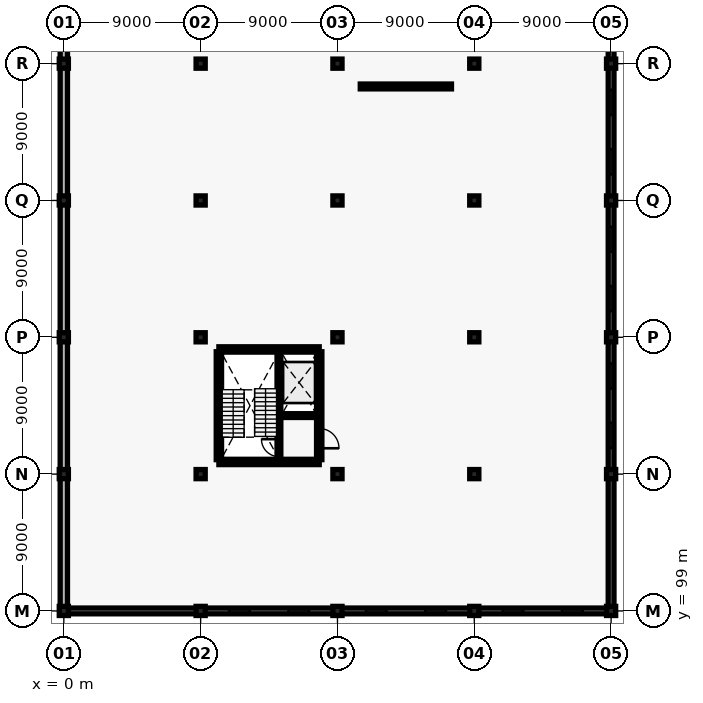
"""IFC4 building model, lengths in metres.
Left out: names, types, materials, properties, quantities, classifications, styles, units other than length and angle.
Written with IfcOpenShell. Run it as: python <this file> out.ifc"""

import sys

from ifc_helpers import new_model, si_unit, direction, frame, frame_2d, origin, origin_2d, place, context, subcontext, project, spatial, rectangle, extrude, element, fill, save


model = new_model("IFC4")
c1 = context("Model", 3, precision=1e-05, world=origin(), true_north=direction((0.0, 1.0)))
c2 = subcontext(c1, "Body", "Model", "MODEL_VIEW")
j1 = project(units=[si_unit("LENGTHUNIT", "METRE"), si_unit("PLANEANGLEUNIT", "RADIAN")], contexts=[c1])
p1 = place(None, origin())
s1 = spatial("IfcSite", under=j1, at=p1, CompositionType="ELEMENT")
p2 = place(p1, origin())
s2 = spatial("IfcBuilding", under=s1, at=p2, CompositionType="ELEMENT")
p3 = place(p2, frame((0.0, 0.0, 5.4)))
s3 = spatial("IfcBuildingStorey", under=s2, at=p3, CompositionType="ELEMENT", Elevation=5.4)
for number, where, z_axis, x_axis in (
    (1, (0.0, 99.0, 0.0), (0.0, 0.0, 1.0), (1.0, 0.0, 0.0)),
    (2, (0.0, 108.0, 0.0), (0.0, 0.0, 1.0), (1.0, 0.0, 0.0)),
    (3, (0.0, 117.0, 0.0), (0.0, 0.0, 1.0), (1.0, 0.0, 0.0)),
    (4, (0.0, 126.0, 0.0), (0.0, 0.0, 1.0), (1.0, 0.0, 0.0)),
    (5, (0.0, 135.0, 0.0), (0.0, 0.0, 1.0), (1.0, 0.0, 0.0)),
    (6, (9.0, 99.0, 0.0), (0.0, 0.0, 1.0), (1.0, 0.0, 0.0)),
    (7, (9.0, 108.0, 0.0), (0.0, 0.0, 1.0), (1.0, 0.0, 0.0)),
    (8, (9.0, 117.0, 0.0), (0.0, 0.0, 1.0), (1.0, 0.0, 0.0)),
    (9, (9.0, 126.0, 0.0), (0.0, 0.0, 1.0), (1.0, 0.0, 0.0)),
    (10, (9.0, 135.0, 0.0), (0.0, 0.0, 1.0), (1.0, 0.0, 0.0)),
    (11, (18.0, 99.0, 0.0), (0.0, 0.0, 1.0), (1.0, 0.0, 0.0)),
    (12, (18.0, 108.0, 0.0), (0.0, 0.0, 1.0), (1.0, 0.0, 0.0)),
    (13, (18.0, 117.0, 0.0), (0.0, 0.0, 1.0), (1.0, 0.0, 0.0)),
    (14, (18.0, 126.0, 0.0), (0.0, 0.0, 1.0), (1.0, 0.0, 0.0)),
    (15, (18.0, 135.0, 0.0), (0.0, 0.0, 1.0), (1.0, 0.0, 0.0)),
    (16, (27.0, 99.0, 0.0), (0.0, 0.0, 1.0), (1.0, 0.0, 0.0)),
    (17, (27.0, 108.0, 0.0), (0.0, 0.0, 1.0), (1.0, 0.0, 0.0)),
    (18, (27.0, 117.0, 0.0), (0.0, 0.0, 1.0), (1.0, 0.0, 0.0)),
    (19, (27.0, 126.0, 0.0), (0.0, 0.0, 1.0), (1.0, 0.0, 0.0)),
    (20, (27.0, 135.0, 0.0), (0.0, 0.0, 1.0), (1.0, 0.0, 0.0)),
    (21, (36.0, 99.0, 0.0), (0.0, 0.0, 1.0), (1.0, 0.0, 0.0)),
    (22, (36.0, 108.0, 0.0), (0.0, 0.0, 1.0), (1.0, 0.0, 0.0)),
    (23, (36.0, 117.0, 0.0), (0.0, 0.0, 1.0), (1.0, 0.0, 0.0)),
    (24, (36.0, 126.0, 0.0), (0.0, 0.0, 1.0), (1.0, 0.0, 0.0)),
    (25, (36.0, 135.0, 0.0), (0.0, 0.0, 1.0), (1.0, 0.0, 0.0)),
):
    element("IfcColumn", number, at=place(p3, frame(where, z_axis=z_axis, x_axis=x_axis)), inside=s3, PredefinedType="COLUMN", context=c2, shape_type="SweptSolid", body=[
        extrude(rectangle(XDim=0.6, YDim=0.6, at=origin_2d()), origin(), (0.0, 0.0, 1.0), 4.2),
    ])
for number, where, z_axis, x_axis in (
    (26, (0.0, 99.06, 0.0), (0.0, 0.0, 1.0), (0.0, 1.0, 0.0)),
    (27, (0.0, 108.06, 0.0), (0.0, 0.0, 1.0), (0.0, 1.0, 0.0)),
    (28, (0.0, 117.06, 0.0), (0.0, 0.0, 1.0), (0.0, 1.0, 0.0)),
    (29, (0.0, 126.06, 0.0), (0.0, 0.0, 1.0), (0.0, 1.0, 0.0)),
    (30, (0.0, 135.06, 0.0), (0.0, 0.0, 1.0), (0.0, 1.0, 0.0)),
):
    element("IfcWall", number, at=place(p3, frame(where, z_axis=z_axis, x_axis=x_axis)), inside=s3, PredefinedType="SOLIDWALL", context=c2, shape_type="SweptSolid", body=[
        extrude(rectangle(XDim=8.88, YDim=0.48, at=frame_2d((4.44, 0.0))), origin(), (0.0, 0.0, 1.0), 3.4),
    ])
p4 = place(p3, frame((0.06, 99.0, 0.0), z_axis=(0.0, 0.0, 1.0), x_axis=(1.0, 0.0, 0.0)))
e31 = element("IfcWall", 31, at=p4, inside=s3, PredefinedType="SOLIDWALL", context=c2, shape_type="SweptSolid", body=[
    extrude(rectangle(XDim=8.88, YDim=0.38, at=frame_2d((4.44, 0.0))), origin(), (0.0, 0.0, 1.0), 3.4),
])
p5 = place(p3, frame((9.06, 99.0, 0.0), z_axis=(0.0, 0.0, 1.0), x_axis=(1.0, 0.0, 0.0)))
e32 = element("IfcWall", 32, at=p5, inside=s3, PredefinedType="SOLIDWALL", context=c2, shape_type="SweptSolid", body=[
    extrude(rectangle(XDim=8.88, YDim=0.38, at=frame_2d((4.44, 0.0))), origin(), (0.0, 0.0, 1.0), 3.4),
])
p6 = place(p5, frame((1.811, 0.0, 0.9)))
e33 = element("IfcOpeningElement", 33, at=p6, cuts=e32, PredefinedType="OPENING", context=c2, shape_type="SweptSolid", body=[
    extrude(rectangle(XDim=1.35, YDim=1.5, at=frame_2d((0.675, 0.75))), frame((0.0, 0.2, 0.0), z_axis=(0.0, -1.0, 0.0), x_axis=(1.0, 0.0, 0.0)), (0.0, 0.0, 1.0), 0.4),
])
p7 = place(p5, frame((5.719, 0.0, 0.9)))
e34 = element("IfcOpeningElement", 34, at=p7, cuts=e32, PredefinedType="OPENING", context=c2, shape_type="SweptSolid", body=[
    extrude(rectangle(XDim=1.35, YDim=1.5, at=frame_2d((0.675, 0.75))), frame((0.0, 0.2, 0.0), z_axis=(0.0, -1.0, 0.0), x_axis=(1.0, 0.0, 0.0)), (0.0, 0.0, 1.0), 0.4),
])
p8 = place(p3, frame((18.06, 99.0, 0.0), z_axis=(0.0, 0.0, 1.0), x_axis=(1.0, 0.0, 0.0)))
e35 = element("IfcWall", 35, at=p8, inside=s3, PredefinedType="SOLIDWALL", context=c2, shape_type="SweptSolid", body=[
    extrude(rectangle(XDim=8.88, YDim=0.38, at=frame_2d((4.44, 0.0))), origin(), (0.0, 0.0, 1.0), 3.4),
])
p9 = place(p8, frame((1.811, 0.0, 0.9)))
e36 = element("IfcOpeningElement", 36, at=p9, cuts=e35, PredefinedType="OPENING", context=c2, shape_type="SweptSolid", body=[
    extrude(rectangle(XDim=1.35, YDim=1.5, at=frame_2d((0.675, 0.75))), frame((0.0, 0.2, 0.0), z_axis=(0.0, -1.0, 0.0), x_axis=(1.0, 0.0, 0.0)), (0.0, 0.0, 1.0), 0.4),
])
p10 = place(p8, frame((5.719, 0.0, 0.9)))
e37 = element("IfcOpeningElement", 37, at=p10, cuts=e35, PredefinedType="OPENING", context=c2, shape_type="SweptSolid", body=[
    extrude(rectangle(XDim=1.35, YDim=1.5, at=frame_2d((0.675, 0.75))), frame((0.0, 0.2, 0.0), z_axis=(0.0, -1.0, 0.0), x_axis=(1.0, 0.0, 0.0)), (0.0, 0.0, 1.0), 0.4),
])
p11 = place(p3, frame((27.06, 99.0, 0.0), z_axis=(0.0, 0.0, 1.0), x_axis=(1.0, 0.0, 0.0)))
e38 = element("IfcWall", 38, at=p11, inside=s3, PredefinedType="SOLIDWALL", context=c2, shape_type="SweptSolid", body=[
    extrude(rectangle(XDim=8.88, YDim=0.38, at=frame_2d((4.44, 0.0))), origin(), (0.0, 0.0, 1.0), 3.4),
])
p12 = place(p11, frame((1.811, 0.0, 0.9)))
e39 = element("IfcOpeningElement", 39, at=p12, cuts=e38, PredefinedType="OPENING", context=c2, shape_type="SweptSolid", body=[
    extrude(rectangle(XDim=1.35, YDim=1.5, at=frame_2d((0.675, 0.75))), frame((0.0, 0.2, 0.0), z_axis=(0.0, -1.0, 0.0), x_axis=(1.0, 0.0, 0.0)), (0.0, 0.0, 1.0), 0.4),
])
p13 = place(p11, frame((5.719, 0.0, 0.9)))
e40 = element("IfcOpeningElement", 40, at=p13, cuts=e38, PredefinedType="OPENING", context=c2, shape_type="SweptSolid", body=[
    extrude(rectangle(XDim=1.35, YDim=1.5, at=frame_2d((0.675, 0.75))), frame((0.0, 0.2, 0.0), z_axis=(0.0, -1.0, 0.0), x_axis=(1.0, 0.0, 0.0)), (0.0, 0.0, 1.0), 0.4),
])
p14 = place(p3, frame((36.0, 99.06, 0.0), z_axis=(0.0, 0.0, 1.0), x_axis=(0.0, 1.0, 0.0)))
e41 = element("IfcWall", 41, at=p14, inside=s3, PredefinedType="SOLIDWALL", context=c2, shape_type="SweptSolid", body=[
    extrude(rectangle(XDim=8.88, YDim=0.38, at=frame_2d((4.44, 0.0))), origin(), (0.0, 0.0, 1.0), 3.4),
])
p15 = place(p3, frame((36.0, 108.06, 0.0), z_axis=(0.0, 0.0, 1.0), x_axis=(0.0, 1.0, 0.0)))
e42 = element("IfcWall", 42, at=p15, inside=s3, PredefinedType="SOLIDWALL", context=c2, shape_type="SweptSolid", body=[
    extrude(rectangle(XDim=8.88, YDim=0.38, at=frame_2d((4.44, 0.0))), origin(), (0.0, 0.0, 1.0), 3.4),
])
p16 = place(p15, frame((1.661, 0.0, 0.9)))
e43 = element("IfcOpeningElement", 43, at=p16, cuts=e42, PredefinedType="OPENING", context=c2, shape_type="SweptSolid", body=[
    extrude(rectangle(XDim=1.65, YDim=1.5, at=frame_2d((0.825, 0.75))), frame((0.0, 0.2, 0.0), z_axis=(0.0, -1.0, 0.0), x_axis=(1.0, 0.0, 0.0)), (0.0, 0.0, 1.0), 0.4),
])
p17 = place(p15, frame((5.569, 0.0, 0.9)))
e44 = element("IfcOpeningElement", 44, at=p17, cuts=e42, PredefinedType="OPENING", context=c2, shape_type="SweptSolid", body=[
    extrude(rectangle(XDim=1.65, YDim=1.5, at=frame_2d((0.825, 0.75))), frame((0.0, 0.2, 0.0), z_axis=(0.0, -1.0, 0.0), x_axis=(1.0, 0.0, 0.0)), (0.0, 0.0, 1.0), 0.4),
])
p18 = place(p3, frame((36.0, 117.06, 0.0), z_axis=(0.0, 0.0, 1.0), x_axis=(0.0, 1.0, 0.0)))
e45 = element("IfcWall", 45, at=p18, inside=s3, PredefinedType="SOLIDWALL", context=c2, shape_type="SweptSolid", body=[
    extrude(rectangle(XDim=8.88, YDim=0.38, at=frame_2d((4.44, 0.0))), origin(), (0.0, 0.0, 1.0), 3.4),
])
p19 = place(p18, frame((1.661, 0.0, 0.9)))
e46 = element("IfcOpeningElement", 46, at=p19, cuts=e45, PredefinedType="OPENING", context=c2, shape_type="SweptSolid", body=[
    extrude(rectangle(XDim=1.65, YDim=1.5, at=frame_2d((0.825, 0.75))), frame((0.0, 0.2, 0.0), z_axis=(0.0, -1.0, 0.0), x_axis=(1.0, 0.0, 0.0)), (0.0, 0.0, 1.0), 0.4),
])
p20 = place(p18, frame((5.569, 0.0, 0.9)))
e47 = element("IfcOpeningElement", 47, at=p20, cuts=e45, PredefinedType="OPENING", context=c2, shape_type="SweptSolid", body=[
    extrude(rectangle(XDim=1.65, YDim=1.5, at=frame_2d((0.825, 0.75))), frame((0.0, 0.2, 0.0), z_axis=(0.0, -1.0, 0.0), x_axis=(1.0, 0.0, 0.0)), (0.0, 0.0, 1.0), 0.4),
])
p21 = place(p3, frame((36.0, 126.06, 0.0), z_axis=(0.0, 0.0, 1.0), x_axis=(0.0, 1.0, 0.0)))
e48 = element("IfcWall", 48, at=p21, inside=s3, PredefinedType="SOLIDWALL", context=c2, shape_type="SweptSolid", body=[
    extrude(rectangle(XDim=8.88, YDim=0.38, at=frame_2d((4.44, 0.0))), origin(), (0.0, 0.0, 1.0), 3.4),
])
p22 = place(p21, frame((1.661, 0.0, 0.9)))
e49 = element("IfcOpeningElement", 49, at=p22, cuts=e48, PredefinedType="OPENING", context=c2, shape_type="SweptSolid", body=[
    extrude(rectangle(XDim=1.65, YDim=1.5, at=frame_2d((0.825, 0.75))), frame((0.0, 0.2, 0.0), z_axis=(0.0, -1.0, 0.0), x_axis=(1.0, 0.0, 0.0)), (0.0, 0.0, 1.0), 0.4),
])
p23 = place(p21, frame((5.569, 0.0, 0.9)))
e50 = element("IfcOpeningElement", 50, at=p23, cuts=e48, PredefinedType="OPENING", context=c2, shape_type="SweptSolid", body=[
    extrude(rectangle(XDim=1.65, YDim=1.5, at=frame_2d((0.825, 0.75))), frame((0.0, 0.2, 0.0), z_axis=(0.0, -1.0, 0.0), x_axis=(1.0, 0.0, 0.0)), (0.0, 0.0, 1.0), 0.4),
])
p24 = place(p3, frame((36.0, 135.06, 0.0), z_axis=(0.0, 0.0, 1.0), x_axis=(0.0, 1.0, 0.0)))
e51 = element("IfcWall", 51, at=p24, inside=s3, PredefinedType="SOLIDWALL", context=c2, shape_type="SweptSolid", body=[
    extrude(rectangle(XDim=8.88, YDim=0.38, at=frame_2d((4.44, 0.0))), origin(), (0.0, 0.0, 1.0), 3.4),
])
p25 = place(p24, frame((1.661, 0.0, 0.9)))
e52 = element("IfcOpeningElement", 52, at=p25, cuts=e51, PredefinedType="OPENING", context=c2, shape_type="SweptSolid", body=[
    extrude(rectangle(XDim=1.65, YDim=1.5, at=frame_2d((0.825, 0.75))), frame((0.0, 0.2, 0.0), z_axis=(0.0, -1.0, 0.0), x_axis=(1.0, 0.0, 0.0)), (0.0, 0.0, 1.0), 0.4),
])
p26 = place(p24, frame((5.569, 0.0, 0.9)))
e53 = element("IfcOpeningElement", 53, at=p26, cuts=e51, PredefinedType="OPENING", context=c2, shape_type="SweptSolid", body=[
    extrude(rectangle(XDim=1.65, YDim=1.5, at=frame_2d((0.825, 0.75))), frame((0.0, 0.2, 0.0), z_axis=(0.0, -1.0, 0.0), x_axis=(1.0, 0.0, 0.0)), (0.0, 0.0, 1.0), 0.4),
])
for number, where, z_axis, x_axis in (
    (54, (10.2, 108.8, 0.0), (0.0, 0.0, 1.0), (1.0, 0.0, 0.0)),
    (55, (10.2, 116.2, 0.0), (0.0, 0.0, 1.0), (1.0, 0.0, 0.0)),
):
    element("IfcWall", number, at=place(p3, frame(where, z_axis=z_axis, x_axis=x_axis)), inside=s3, PredefinedType="SHEAR", context=c2, shape_type="SweptSolid", body=[
        extrude(rectangle(XDim=6.6, YDim=0.35, at=frame_2d((3.3, 0.0))), origin(), (0.0, 0.0, 1.0), 4.2),
    ])
p27 = place(p3, frame((10.2, 108.95, 0.0), z_axis=(0.0, 0.0, 1.0), x_axis=(0.0, 1.0, 0.0)))
e56 = element("IfcWall", 56, at=p27, inside=s3, PredefinedType="SHEAR", context=c2, shape_type="SweptSolid", body=[
    extrude(rectangle(XDim=7.1, YDim=0.35, at=frame_2d((3.55, 0.0))), origin(), (0.0, 0.0, 1.0), 4.2),
])
p28 = place(p3, frame((16.8, 108.95, 0.0), z_axis=(0.0, 0.0, 1.0), x_axis=(0.0, 1.0, 0.0)))
e57 = element("IfcWall", 57, at=p28, inside=s3, PredefinedType="SHEAR", context=c2, shape_type="SweptSolid", body=[
    extrude(rectangle(XDim=7.1, YDim=0.35, at=frame_2d((3.55, 0.0))), origin(), (0.0, 0.0, 1.0), 4.2),
])
p29 = place(p28, frame((0.75, 0.0, 0.0)))
e58 = element("IfcOpeningElement", 58, at=p29, cuts=e57, PredefinedType="OPENING", context=c2, shape_type="SweptSolid", body=[
    extrude(rectangle(XDim=1.3, YDim=2.15, at=frame_2d((0.65, 1.075))), frame((0.0, 0.185, 0.0), z_axis=(0.0, -1.0, 0.0), x_axis=(1.0, 0.0, 0.0)), (0.0, 0.0, 1.0), 0.37),
])
p30 = place(p3, frame((14.15, 108.95, 0.0), z_axis=(0.0, 0.0, 1.0), x_axis=(0.0, 1.0, 0.0)))
e59 = element("IfcWall", 59, at=p30, inside=s3, PredefinedType="SHEAR", context=c2, shape_type="SweptSolid", body=[
    extrude(rectangle(XDim=7.1, YDim=0.25, at=frame_2d((3.55, 0.0))), origin(), (0.0, 0.0, 1.0), 4.2),
])
p31 = place(p30, frame((0.2, 0.0, 0.0)))
e60 = element("IfcOpeningElement", 60, at=p31, cuts=e59, PredefinedType="OPENING", context=c2, shape_type="SweptSolid", body=[
    extrude(rectangle(XDim=1.15, YDim=2.15, at=frame_2d((0.575, 1.075))), frame((0.0, 0.135, 0.0), z_axis=(0.0, -1.0, 0.0), x_axis=(1.0, 0.0, 0.0)), (0.0, 0.0, 1.0), 0.27),
])
p32 = place(p3, frame((14.27, 111.85, 0.0), z_axis=(0.0, 0.0, 1.0), x_axis=(1.0, 0.0, 0.0)))
e61 = element("IfcWall", 61, at=p32, inside=s3, PredefinedType="SHEAR", context=c2, shape_type="SweptSolid", body=[
    extrude(rectangle(XDim=2.38, YDim=0.25, at=frame_2d((1.19, 0.0))), origin(), (0.0, 0.0, 1.0), 4.2),
])
p33 = place(p32, frame((0.39, 0.0, 0.0)))
e62 = element("IfcOpeningElement", 62, at=p33, cuts=e61, PredefinedType="OPENING", context=c2, shape_type="SweptSolid", body=[
    extrude(rectangle(XDim=1.6, YDim=2.3, at=frame_2d((0.8, 1.15))), frame((0.0, 0.135, 0.0), z_axis=(0.0, -1.0, 0.0), x_axis=(1.0, 0.0, 0.0)), (0.0, 0.0, 1.0), 0.27),
])
p34 = place(p3, frame((19.5, 133.5, 0.0), z_axis=(0.0, 0.0, 1.0), x_axis=(1.0, 0.0, 0.0)))
e63 = element("IfcWall", 63, at=p34, inside=s3, PredefinedType="PARTITIONING", context=c2, shape_type="SweptSolid", body=[
    extrude(rectangle(XDim=6.0, YDim=0.32, at=frame_2d((3.0, 0.0))), origin(), (0.0, 0.0, 1.0), 3.2),
])
p35 = place(p34, frame((1.95, 0.0, 0.0)))
e64 = element("IfcOpeningElement", 64, at=p35, cuts=e63, PredefinedType="OPENING", context=c2, shape_type="SweptSolid", body=[
    extrude(rectangle(XDim=2.1, YDim=2.6, at=frame_2d((1.05, 1.3))), frame((0.0, 0.17, 0.0), z_axis=(0.0, -1.0, 0.0), x_axis=(1.0, 0.0, 0.0)), (0.0, 0.0, 1.0), 0.34),
])
p36 = place(p6, origin())
e65 = element("IfcWindow", 65, at=p36, inside=s3, PartitioningType="SINGLE_PANEL", PredefinedType="WINDOW", context=c2, shape_type="SweptSolid", body=[
    extrude(rectangle(XDim=1.35, YDim=1.5, at=frame_2d((0.675, 0.75))), frame((0.0, 0.03, 0.0), z_axis=(0.0, -1.0, 0.0), x_axis=(1.0, 0.0, 0.0)), (0.0, 0.0, 1.0), 0.06),
])
fill(e33, e65)
p37 = place(p7, origin())
e66 = element("IfcWindow", 66, at=p37, inside=s3, PartitioningType="SINGLE_PANEL", PredefinedType="WINDOW", context=c2, shape_type="SweptSolid", body=[
    extrude(rectangle(XDim=1.35, YDim=1.5, at=frame_2d((0.675, 0.75))), frame((0.0, 0.03, 0.0), z_axis=(0.0, -1.0, 0.0), x_axis=(1.0, 0.0, 0.0)), (0.0, 0.0, 1.0), 0.06),
])
fill(e34, e66)
p38 = place(p9, origin())
e67 = element("IfcWindow", 67, at=p38, inside=s3, PartitioningType="SINGLE_PANEL", PredefinedType="WINDOW", context=c2, shape_type="SweptSolid", body=[
    extrude(rectangle(XDim=1.35, YDim=1.5, at=frame_2d((0.675, 0.75))), frame((0.0, 0.03, 0.0), z_axis=(0.0, -1.0, 0.0), x_axis=(1.0, 0.0, 0.0)), (0.0, 0.0, 1.0), 0.06),
])
fill(e36, e67)
p39 = place(p10, origin())
e68 = element("IfcWindow", 68, at=p39, inside=s3, PartitioningType="SINGLE_PANEL", PredefinedType="WINDOW", context=c2, shape_type="SweptSolid", body=[
    extrude(rectangle(XDim=1.35, YDim=1.5, at=frame_2d((0.675, 0.75))), frame((0.0, 0.03, 0.0), z_axis=(0.0, -1.0, 0.0), x_axis=(1.0, 0.0, 0.0)), (0.0, 0.0, 1.0), 0.06),
])
fill(e37, e68)
p40 = place(p12, origin())
e69 = element("IfcWindow", 69, at=p40, inside=s3, PartitioningType="SINGLE_PANEL", PredefinedType="WINDOW", context=c2, shape_type="SweptSolid", body=[
    extrude(rectangle(XDim=1.35, YDim=1.5, at=frame_2d((0.675, 0.75))), frame((0.0, 0.03, 0.0), z_axis=(0.0, -1.0, 0.0), x_axis=(1.0, 0.0, 0.0)), (0.0, 0.0, 1.0), 0.06),
])
fill(e39, e69)
p41 = place(p13, origin())
e70 = element("IfcWindow", 70, at=p41, inside=s3, PartitioningType="SINGLE_PANEL", PredefinedType="WINDOW", context=c2, shape_type="SweptSolid", body=[
    extrude(rectangle(XDim=1.35, YDim=1.5, at=frame_2d((0.675, 0.75))), frame((0.0, 0.03, 0.0), z_axis=(0.0, -1.0, 0.0), x_axis=(1.0, 0.0, 0.0)), (0.0, 0.0, 1.0), 0.06),
])
fill(e40, e70)
p42 = place(p16, origin())
e71 = element("IfcWindow", 71, at=p42, inside=s3, PartitioningType="SINGLE_PANEL", PredefinedType="WINDOW", context=c2, shape_type="SweptSolid", body=[
    extrude(rectangle(XDim=1.65, YDim=1.5, at=frame_2d((0.825, 0.75))), frame((0.0, 0.03, 0.0), z_axis=(0.0, -1.0, 0.0), x_axis=(1.0, 0.0, 0.0)), (0.0, 0.0, 1.0), 0.06),
])
fill(e43, e71)
p43 = place(p17, origin())
e72 = element("IfcWindow", 72, at=p43, inside=s3, PartitioningType="SINGLE_PANEL", PredefinedType="WINDOW", context=c2, shape_type="SweptSolid", body=[
    extrude(rectangle(XDim=1.65, YDim=1.5, at=frame_2d((0.825, 0.75))), frame((0.0, 0.03, 0.0), z_axis=(0.0, -1.0, 0.0), x_axis=(1.0, 0.0, 0.0)), (0.0, 0.0, 1.0), 0.06),
])
fill(e44, e72)
p44 = place(p19, origin())
e73 = element("IfcWindow", 73, at=p44, inside=s3, PartitioningType="SINGLE_PANEL", PredefinedType="WINDOW", context=c2, shape_type="SweptSolid", body=[
    extrude(rectangle(XDim=1.65, YDim=1.5, at=frame_2d((0.825, 0.75))), frame((0.0, 0.03, 0.0), z_axis=(0.0, -1.0, 0.0), x_axis=(1.0, 0.0, 0.0)), (0.0, 0.0, 1.0), 0.06),
])
fill(e46, e73)
p45 = place(p20, origin())
e74 = element("IfcWindow", 74, at=p45, inside=s3, PartitioningType="SINGLE_PANEL", PredefinedType="WINDOW", context=c2, shape_type="SweptSolid", body=[
    extrude(rectangle(XDim=1.65, YDim=1.5, at=frame_2d((0.825, 0.75))), frame((0.0, 0.03, 0.0), z_axis=(0.0, -1.0, 0.0), x_axis=(1.0, 0.0, 0.0)), (0.0, 0.0, 1.0), 0.06),
])
fill(e47, e74)
p46 = place(p22, origin())
e75 = element("IfcWindow", 75, at=p46, inside=s3, PartitioningType="SINGLE_PANEL", PredefinedType="WINDOW", context=c2, shape_type="SweptSolid", body=[
    extrude(rectangle(XDim=1.65, YDim=1.5, at=frame_2d((0.825, 0.75))), frame((0.0, 0.03, 0.0), z_axis=(0.0, -1.0, 0.0), x_axis=(1.0, 0.0, 0.0)), (0.0, 0.0, 1.0), 0.06),
])
fill(e49, e75)
p47 = place(p23, origin())
e76 = element("IfcWindow", 76, at=p47, inside=s3, PartitioningType="SINGLE_PANEL", PredefinedType="WINDOW", context=c2, shape_type="SweptSolid", body=[
    extrude(rectangle(XDim=1.65, YDim=1.5, at=frame_2d((0.825, 0.75))), frame((0.0, 0.03, 0.0), z_axis=(0.0, -1.0, 0.0), x_axis=(1.0, 0.0, 0.0)), (0.0, 0.0, 1.0), 0.06),
])
fill(e50, e76)
p48 = place(p29, frame((1.3, 0.0, 0.0), z_axis=(0.0, 0.0, 1.0), x_axis=(-1.0, 0.0, 0.0)))
e77 = element("IfcDoor", 77, at=p48, inside=s3, OperationType="DOUBLE_DOOR_SINGLE_SWING", PredefinedType="DOOR", context=c2, shape_type="SweptSolid", body=[
    extrude(rectangle(XDim=1.3, YDim=2.15, at=frame_2d((0.65, 1.075))), frame((0.0, 0.025, 0.0), z_axis=(0.0, -1.0, 0.0), x_axis=(1.0, 0.0, 0.0)), (0.0, 0.0, 1.0), 0.05),
])
fill(e58, e77)
p49 = place(p31, frame((1.15, 0.0, 0.0), z_axis=(0.0, 0.0, 1.0), x_axis=(-1.0, 0.0, 0.0)))
e78 = element("IfcDoor", 78, at=p49, inside=s3, OperationType="SINGLE_SWING_RIGHT", PredefinedType="DOOR", context=c2, shape_type="SweptSolid", body=[
    extrude(rectangle(XDim=1.15, YDim=2.15, at=frame_2d((0.575, 1.075))), frame((0.0, 0.025, 0.0), z_axis=(0.0, -1.0, 0.0), x_axis=(1.0, 0.0, 0.0)), (0.0, 0.0, 1.0), 0.05),
])
fill(e60, e78)
p50 = place(p33, origin())
e79 = element("IfcDoor", 79, at=p50, inside=s3, OperationType="SLIDING_TO_LEFT", PredefinedType="DOOR", context=c2, shape_type="SweptSolid", body=[
    extrude(rectangle(XDim=1.6, YDim=2.3, at=frame_2d((0.8, 1.15))), frame((0.0, 0.025, 0.0), z_axis=(0.0, -1.0, 0.0), x_axis=(1.0, 0.0, 0.0)), (0.0, 0.0, 1.0), 0.05),
])
fill(e62, e79)
p51 = place(p35, origin())
e80 = element("IfcDoor", 80, at=p51, inside=s3, OperationType="SLIDING_TO_LEFT", PredefinedType="DOOR", context=c2, shape_type="SweptSolid", body=[
    extrude(rectangle(XDim=2.1, YDim=2.6, at=frame_2d((1.05, 1.3))), frame((0.0, 0.025, 0.0), z_axis=(0.0, -1.0, 0.0), x_axis=(1.0, 0.0, 0.0)), (0.0, 0.0, 1.0), 0.05),
])
fill(e64, e80)
save(model, sys.argv[1])
